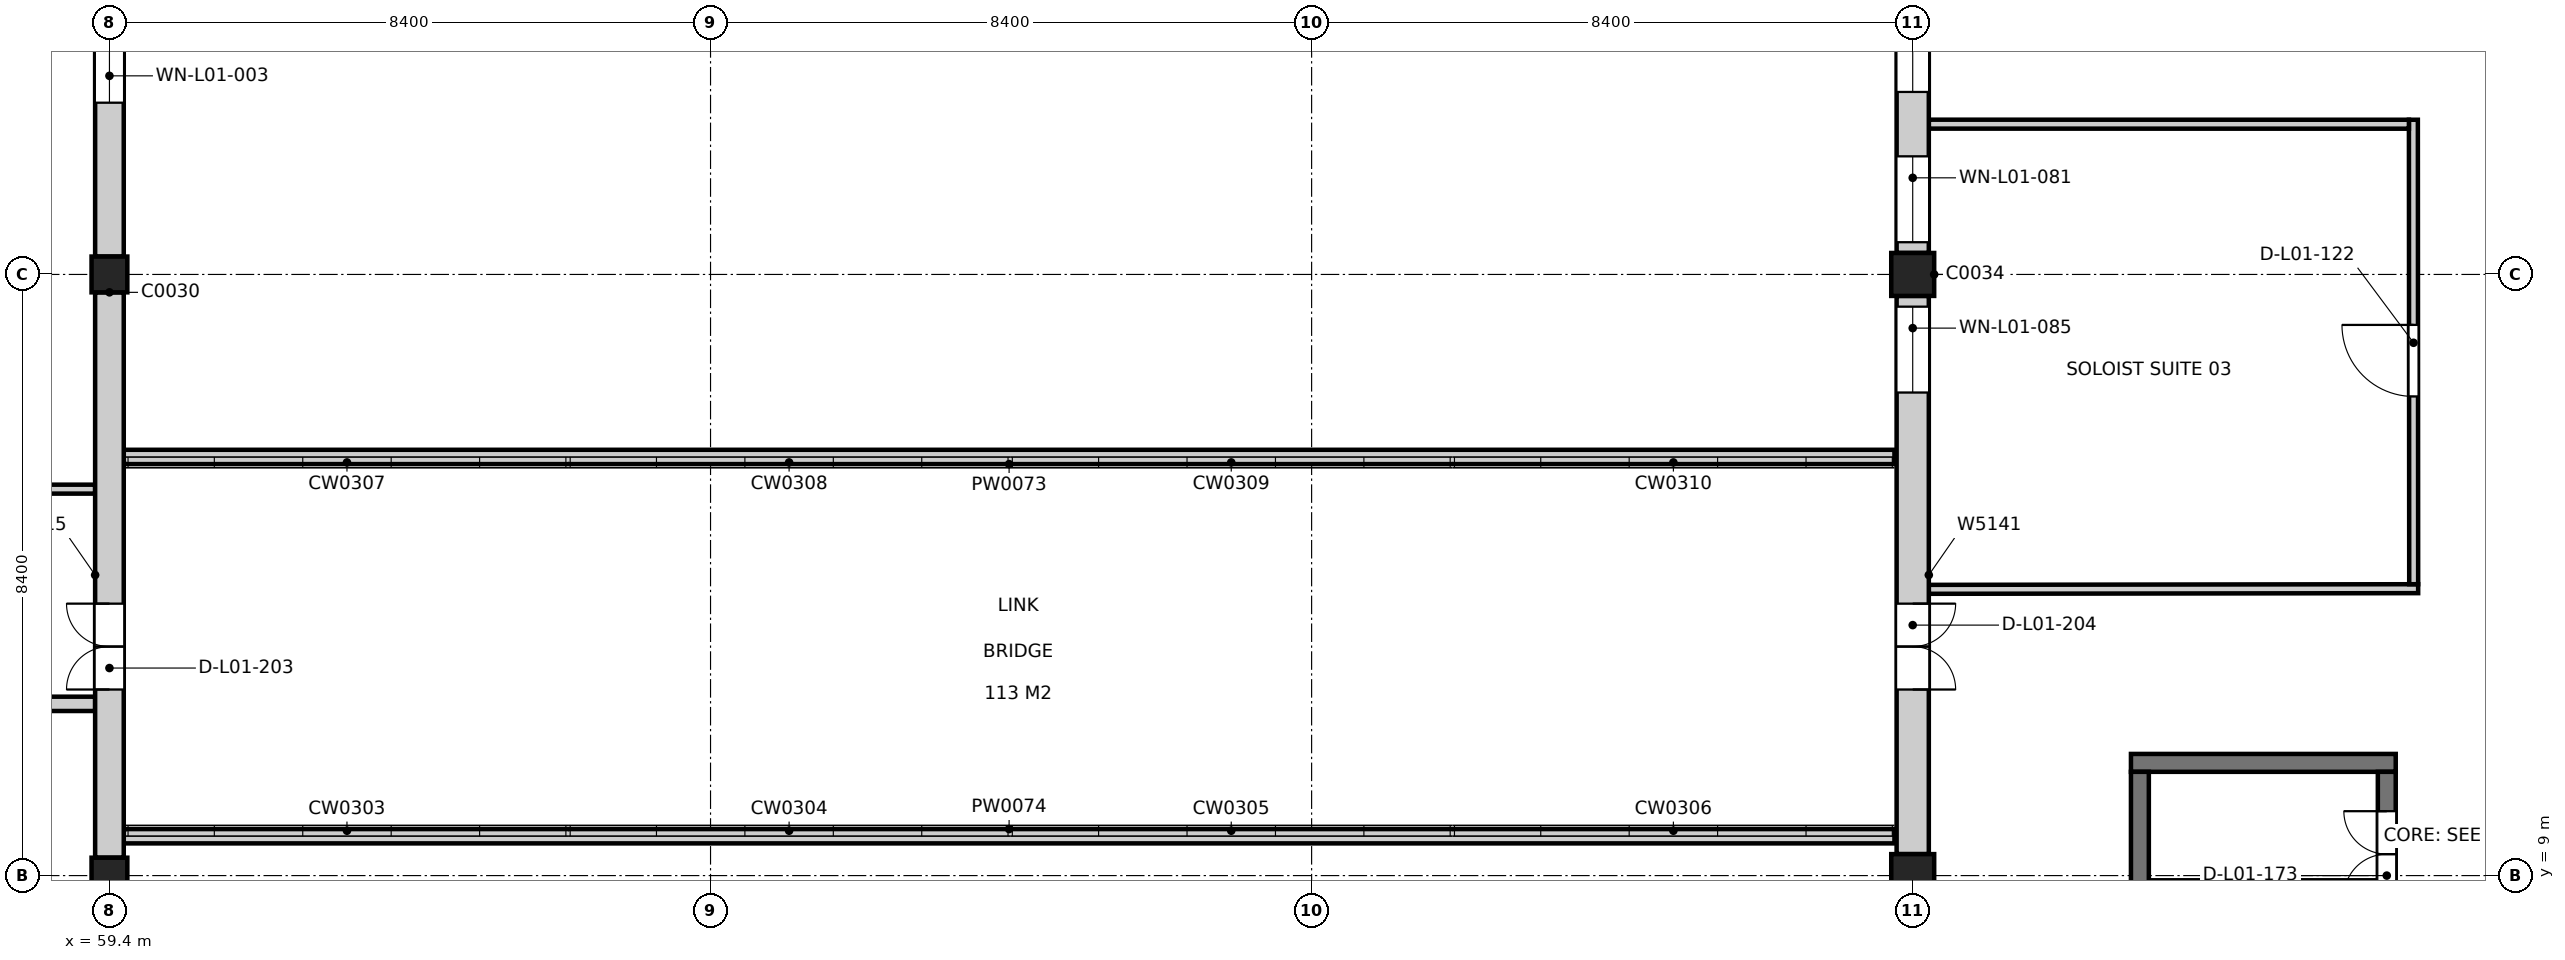
"""IFC4 building model, lengths in metres.
Left out: names, types, materials, properties, quantities, classifications, styles, units other than length and angle.
Written with IfcOpenShell. Run it as: python <this file> out.ifc"""

import sys

from ifc_helpers import new_model, si_unit, direction, frame, frame_2d, origin, origin_2d, place, context, subcontext, project, spatial, rectangle, extrude, element, fill, save


model = new_model("IFC4")
c1 = context("Model", 3, precision=1e-05, world=origin(), true_north=direction((0.0, 1.0)))
c2 = subcontext(c1, "Body", "Model", "MODEL_VIEW")
j1 = project(units=[si_unit("LENGTHUNIT", "METRE"), si_unit("PLANEANGLEUNIT", "RADIAN")], contexts=[c1])
p1 = place(None, origin())
s1 = spatial("IfcSite", under=j1, at=p1, CompositionType="ELEMENT")
p2 = place(p1, origin())
s2 = spatial("IfcBuilding", under=s1, at=p2, CompositionType="ELEMENT")
p3 = place(p2, frame((0.0, 0.0, 4.8)))
s3 = spatial("IfcBuildingStorey", under=s2, at=p3, CompositionType="ELEMENT", Elevation=4.8)
for number, where, z_axis, x_axis in (
    (1, (59.4, 9.0, 0.0), (0.0, 0.0, 1.0), (1.0, 0.0, 0.0)),
    (2, (59.4, 17.4, 0.0), (0.0, 0.0, 1.0), (1.0, 0.0, 0.0)),
):
    element("IfcColumn", number, at=place(p3, frame(where, z_axis=z_axis, x_axis=x_axis)), inside=s3, PredefinedType="COLUMN", context=c2, shape_type="SweptSolid", body=[
        extrude(rectangle(XDim=0.5, YDim=0.5, at=origin_2d()), origin(), (0.0, 0.0, 1.0), 4.8),
    ])
for number, where, z_axis, x_axis in (
    (3, (84.6, 9.0, 0.0), (0.0, 0.0, 1.0), (1.0, 0.0, 0.0)),
    (4, (84.6, 17.4, 0.0), (0.0, 0.0, 1.0), (1.0, 0.0, 0.0)),
):
    element("IfcColumn", number, at=place(p3, frame(where, z_axis=z_axis, x_axis=x_axis)), inside=s3, PredefinedType="COLUMN", context=c2, shape_type="SweptSolid", body=[
        extrude(rectangle(XDim=0.6, YDim=0.6, at=origin_2d()), origin(), (0.0, 0.0, 1.0), 4.8),
    ])
p4 = place(p3, frame((87.65, 10.575, 0.0), z_axis=(0.0, 0.0, 1.0), x_axis=(1.0, 0.0, 0.0)))
e5 = element("IfcWall", 5, at=p4, inside=s3, PredefinedType="SOLIDWALL", context=c2, shape_type="SweptSolid", body=[
    extrude(rectangle(XDim=3.7, YDim=0.25, at=frame_2d((1.85, 0.0))), origin(), (0.0, 0.0, 1.0), 4.8),
])
p5 = place(p3, frame((87.775, 3.55, 0.0), z_axis=(0.0, 0.0, 1.0), x_axis=(0.0, 1.0, 0.0)))
e6 = element("IfcWall", 6, at=p5, inside=s3, PredefinedType="SOLIDWALL", context=c2, shape_type="SweptSolid", body=[
    extrude(rectangle(XDim=6.9, YDim=0.25, at=frame_2d((3.45, 0.0))), origin(), (0.0, 0.0, 1.0), 4.8),
])
p6 = place(p3, frame((91.225, 3.55, 0.0), z_axis=(0.0, 0.0, 1.0), x_axis=(0.0, 1.0, 0.0)))
e7 = element("IfcWall", 7, at=p6, inside=s3, PredefinedType="SOLIDWALL", context=c2, shape_type="SweptSolid", body=[
    extrude(rectangle(XDim=6.9, YDim=0.25, at=frame_2d((3.45, 0.0))), origin(), (0.0, 0.0, 1.0), 4.8),
])
p7 = place(p6, frame((5.15, 0.0, 0.0)))
e8 = element("IfcOpeningElement", 8, at=p7, cuts=e7, PredefinedType="OPENING", context=c2, shape_type="SweptSolid", body=[
    extrude(rectangle(XDim=1.2, YDim=2.1, at=frame_2d((0.6, 1.05))), frame((0.0, 0.135, 0.0), z_axis=(0.0, -1.0, 0.0), x_axis=(1.0, 0.0, 0.0)), (0.0, 0.0, 1.0), 0.27),
])
p8 = place(p3, frame((84.825, 13.0, 0.0), z_axis=(0.0, 0.0, 1.0), x_axis=(0.999999127538, 0.001320955649, 0.0)))
e9 = element("IfcWall", 9, at=p8, inside=s3, PredefinedType="PARTITIONING", context=c2, shape_type="SweptSolid", body=[
    extrude(rectangle(XDim=6.838, YDim=0.125, at=frame_2d((3.419, 0.0))), origin(), (0.0, 0.0, 1.0), 4.64),
])
p9 = place(p3, frame((91.601, 13.072, 0.0), z_axis=(0.0, 0.0, 1.0), x_axis=(-0.000639506321, 0.999999795516, 0.0)))
e10 = element("IfcWall", 10, at=p9, inside=s3, PredefinedType="PARTITIONING", context=c2, shape_type="SweptSolid", body=[
    extrude(rectangle(XDim=6.49, YDim=0.125, at=frame_2d((3.245, 0.0))), origin(), (0.0, 0.0, 1.0), 3.84),
])
p10 = place(p9, frame((2.624, 0.0, 0.0)))
e11 = element("IfcOpeningElement", 11, at=p10, cuts=e10, PredefinedType="OPENING", context=c2, shape_type="SweptSolid", body=[
    extrude(rectangle(XDim=1.0, YDim=2.1, at=frame_2d((0.5, 1.05))), frame((0.0, 0.073, 0.0), z_axis=(0.0, -1.0, 0.0), x_axis=(1.0, 0.0, 0.0)), (0.0, 0.0, 1.0), 0.145),
])
p11 = place(p3, frame((91.534, 19.499, 0.0), z_axis=(0.0, 0.0, 1.0), x_axis=(-0.999999989407, 0.000145555109, 0.0)))
e12 = element("IfcWall", 12, at=p11, inside=s3, PredefinedType="PARTITIONING", context=c2, shape_type="SweptSolid", body=[
    extrude(rectangle(XDim=6.709, YDim=0.125, at=frame_2d((3.354, 0.0))), origin(), (0.0, 0.0, 1.0), 4.64),
])
p12 = place(p3, frame((56.0, 11.4, 0.0), z_axis=(0.0, 0.0, 1.0), x_axis=(1.0, 0.0, 0.0)))
e13 = element("IfcWall", 13, at=p12, inside=s3, PredefinedType="PARTITIONING", context=c2, shape_type="SweptSolid", body=[
    extrude(rectangle(XDim=3.2, YDim=0.2, at=frame_2d((1.6, 0.0))), origin(), (0.0, 0.0, 1.0), 4.64),
])
p13 = place(p12, frame((1.05, 0.0, 0.0)))
e14 = element("IfcOpeningElement", 14, at=p13, cuts=e13, PredefinedType="OPENING", context=c2, shape_type="SweptSolid", body=[
    extrude(rectangle(XDim=1.0, YDim=2.1, at=frame_2d((0.5, 1.05))), frame((0.0, 0.11, 0.0), z_axis=(0.0, -1.0, 0.0), x_axis=(1.0, 0.0, 0.0)), (0.0, 0.0, 1.0), 0.22),
])
p14 = place(p3, frame((50.02, 14.399, 0.0), z_axis=(0.0, 0.0, 1.0), x_axis=(0.999999994342, 0.000106380149, 0.0)))
e15 = element("IfcWall", 15, at=p14, inside=s3, PredefinedType="PARTITIONING", context=c2, shape_type="SweptSolid", body=[
    extrude(rectangle(XDim=9.18, YDim=0.125, at=frame_2d((4.59, 0.0))), origin(), (0.0, 0.0, 1.0), 3.84),
])
p15 = place(p14, frame((4.03, 0.0, 0.0)))
e16 = element("IfcOpeningElement", 16, at=p15, cuts=e15, PredefinedType="OPENING", context=c2, shape_type="SweptSolid", body=[
    extrude(rectangle(XDim=1.0, YDim=2.1, at=frame_2d((0.5, 1.05))), frame((0.0, 0.073, 0.0), z_axis=(0.0, -1.0, 0.0), x_axis=(1.0, 0.0, 0.0)), (0.0, 0.0, 1.0), 0.145),
])
p16 = place(p3, frame((59.4, 9.25, 0.0), z_axis=(0.0, 0.0, 1.0), x_axis=(0.0, 1.0, 0.0)))
e17 = element("IfcWall", 17, at=p16, inside=s3, PredefinedType="SOLIDWALL", context=c2, shape_type="SweptSolid", body=[
    extrude(rectangle(XDim=7.9, YDim=0.4, at=frame_2d((3.95, 0.0))), origin(), (0.0, 0.0, 1.0), 3.84),
])
p17 = place(p16, frame((2.35, 0.0, 0.0)))
e18 = element("IfcOpeningElement", 18, at=p17, cuts=e17, PredefinedType="OPENING", context=c2, shape_type="SweptSolid", body=[
    extrude(rectangle(XDim=1.2, YDim=2.1, at=frame_2d((0.6, 1.05))), frame((0.0, 0.21, 0.0), z_axis=(0.0, -1.0, 0.0), x_axis=(1.0, 0.0, 0.0)), (0.0, 0.0, 1.0), 0.42),
])
p18 = place(p3, frame((59.4, 17.65, 0.0), z_axis=(0.0, 0.0, 1.0), x_axis=(0.0, 1.0, 0.0)))
e19 = element("IfcWall", 19, at=p18, inside=s3, PredefinedType="SOLIDWALL", context=c2, shape_type="SweptSolid", body=[
    extrude(rectangle(XDim=7.9, YDim=0.4, at=frame_2d((3.95, 0.0))), origin(), (0.0, 0.0, 1.0), 3.84),
])
p19 = place(p18, frame((2.15, 0.0, 0.9)))
e20 = element("IfcOpeningElement", 20, at=p19, cuts=e19, PredefinedType="OPENING", context=c2, shape_type="SweptSolid", body=[
    extrude(rectangle(XDim=1.5, YDim=1.5, at=frame_2d((0.75, 0.75))), frame((0.0, 0.21, 0.0), z_axis=(0.0, -1.0, 0.0), x_axis=(1.0, 0.0, 0.0)), (0.0, 0.0, 1.0), 0.42),
])
p20 = place(p18, frame((4.25, 0.0, 0.9)))
e21 = element("IfcOpeningElement", 21, at=p20, cuts=e19, PredefinedType="OPENING", context=c2, shape_type="SweptSolid", body=[
    extrude(rectangle(XDim=1.5, YDim=1.5, at=frame_2d((0.75, 0.75))), frame((0.0, 0.21, 0.0), z_axis=(0.0, -1.0, 0.0), x_axis=(1.0, 0.0, 0.0)), (0.0, 0.0, 1.0), 0.42),
])
p21 = place(p3, frame((84.6, 25.5, 0.0), z_axis=(0.0, 0.0, 1.0), x_axis=(0.0, -1.0, 0.0)))
e22 = element("IfcWall", 22, at=p21, inside=s3, PredefinedType="SOLIDWALL", context=c2, shape_type="SweptSolid", body=[
    extrude(rectangle(XDim=7.8, YDim=0.45, at=frame_2d((3.9, 0.0))), origin(), (0.0, 0.0, 1.0), 3.84),
])
p22 = place(p21, frame((6.45, 0.0, 0.9)))
e23 = element("IfcOpeningElement", 23, at=p22, cuts=e22, PredefinedType="OPENING", context=c2, shape_type="SweptSolid", body=[
    extrude(rectangle(XDim=1.2, YDim=2.4, at=frame_2d((0.6, 1.2))), frame((0.0, 0.235, 0.0), z_axis=(0.0, -1.0, 0.0), x_axis=(1.0, 0.0, 0.0)), (0.0, 0.0, 1.0), 0.47),
])
p23 = place(p21, frame((4.35, 0.0, 0.9)))
e24 = element("IfcOpeningElement", 24, at=p23, cuts=e22, PredefinedType="OPENING", context=c2, shape_type="SweptSolid", body=[
    extrude(rectangle(XDim=1.2, YDim=2.4, at=frame_2d((0.6, 1.2))), frame((0.0, 0.235, 0.0), z_axis=(0.0, -1.0, 0.0), x_axis=(1.0, 0.0, 0.0)), (0.0, 0.0, 1.0), 0.47),
])
p24 = place(p21, frame((2.25, 0.0, 0.9)))
e25 = element("IfcOpeningElement", 25, at=p24, cuts=e22, PredefinedType="OPENING", context=c2, shape_type="SweptSolid", body=[
    extrude(rectangle(XDim=1.2, YDim=2.4, at=frame_2d((0.6, 1.2))), frame((0.0, 0.235, 0.0), z_axis=(0.0, -1.0, 0.0), x_axis=(1.0, 0.0, 0.0)), (0.0, 0.0, 1.0), 0.47),
])
p25 = place(p21, frame((0.15, 0.0, 0.9)))
e26 = element("IfcOpeningElement", 26, at=p25, cuts=e22, PredefinedType="OPENING", context=c2, shape_type="SweptSolid", body=[
    extrude(rectangle(XDim=1.2, YDim=2.4, at=frame_2d((0.6, 1.2))), frame((0.0, 0.235, 0.0), z_axis=(0.0, -1.0, 0.0), x_axis=(1.0, 0.0, 0.0)), (0.0, 0.0, 1.0), 0.47),
])
p26 = place(p3, frame((84.6, 17.1, 0.0), z_axis=(0.0, 0.0, 1.0), x_axis=(0.0, -1.0, 0.0)))
e27 = element("IfcWall", 27, at=p26, inside=s3, PredefinedType="SOLIDWALL", context=c2, shape_type="SweptSolid", body=[
    extrude(rectangle(XDim=7.8, YDim=0.45, at=frame_2d((3.9, 0.0))), origin(), (0.0, 0.0, 1.0), 3.84),
])
p27 = place(p26, frame((0.15, 0.0, 0.9)))
e28 = element("IfcOpeningElement", 28, at=p27, cuts=e27, PredefinedType="OPENING", context=c2, shape_type="SweptSolid", body=[
    extrude(rectangle(XDim=1.2, YDim=2.4, at=frame_2d((0.6, 1.2))), frame((0.0, 0.235, 0.0), z_axis=(0.0, -1.0, 0.0), x_axis=(1.0, 0.0, 0.0)), (0.0, 0.0, 1.0), 0.47),
])
p28 = place(p26, frame((4.3, 0.0, 0.0)))
e29 = element("IfcOpeningElement", 29, at=p28, cuts=e27, PredefinedType="OPENING", context=c2, shape_type="SweptSolid", body=[
    extrude(rectangle(XDim=1.2, YDim=2.1, at=frame_2d((0.6, 1.05))), frame((0.0, 0.235, 0.0), z_axis=(0.0, -1.0, 0.0), x_axis=(1.0, 0.0, 0.0)), (0.0, 0.0, 1.0), 0.47),
])
for number, where, z_axis, x_axis in (
    (30, (84.345, 14.85, 3.58), (0.0, 0.0, 1.0), (-1.0, 0.0, 0.0)),
    (31, (59.6, 9.55, 3.58), (0.0, 0.0, 1.0), (1.0, 0.0, 0.0)),
):
    element("IfcWall", number, at=place(p3, frame(where, z_axis=z_axis, x_axis=x_axis)), inside=s3, PredefinedType="PARAPET", context=c2, shape_type="SweptSolid", body=[
        extrude(rectangle(XDim=24.745, YDim=0.2, at=frame_2d((12.373, 0.0))), origin(), (0.0, 0.0, 1.0), 1.1),
    ])
p29 = place(p10, origin())
e32 = element("IfcDoor", 32, at=p29, inside=s3, OperationType="SINGLE_SWING_RIGHT", PredefinedType="DOOR", context=c2, shape_type="SweptSolid", body=[
    extrude(rectangle(XDim=1.0, YDim=2.1, at=frame_2d((0.5, 1.05))), frame((0.0, 0.025, 0.0), z_axis=(0.0, -1.0, 0.0), x_axis=(1.0, 0.0, 0.0)), (0.0, 0.0, 1.0), 0.05),
])
fill(e11, e32)
p30 = place(p7, origin())
e33 = element("IfcDoor", 33, at=p30, inside=s3, OperationType="DOUBLE_DOOR_SINGLE_SWING", PredefinedType="DOOR", context=c2, shape_type="SweptSolid", body=[
    extrude(rectangle(XDim=1.2, YDim=2.1, at=frame_2d((0.6, 1.05))), frame((0.0, 0.025, 0.0), z_axis=(0.0, -1.0, 0.0), x_axis=(1.0, 0.0, 0.0)), (0.0, 0.0, 1.0), 0.05),
])
fill(e8, e33)
p31 = place(p19, origin())
e34 = element("IfcWindow", 34, at=p31, inside=s3, PartitioningType="DOUBLE_PANEL_VERTICAL", PredefinedType="WINDOW", context=c2, shape_type="SweptSolid", body=[
    extrude(rectangle(XDim=1.5, YDim=1.5, at=frame_2d((0.75, 0.75))), frame((0.0, 0.15, 0.0), z_axis=(0.0, -1.0, 0.0), x_axis=(1.0, 0.0, 0.0)), (0.0, 0.0, 1.0), 0.06),
])
fill(e20, e34)
p32 = place(p22, origin())
e35 = element("IfcWindow", 35, at=p32, inside=s3, PartitioningType="SINGLE_PANEL", PredefinedType="WINDOW", context=c2, shape_type="SweptSolid", body=[
    extrude(rectangle(XDim=1.2, YDim=2.4, at=frame_2d((0.6, 1.2))), frame((0.0, 0.135, 0.0), z_axis=(0.0, -1.0, 0.0), x_axis=(1.0, 0.0, 0.0)), (0.0, 0.0, 1.0), 0.06),
])
fill(e23, e35)
p33 = place(p23, origin())
e36 = element("IfcWindow", 36, at=p33, inside=s3, PartitioningType="SINGLE_PANEL", PredefinedType="WINDOW", context=c2, shape_type="SweptSolid", body=[
    extrude(rectangle(XDim=1.2, YDim=2.4, at=frame_2d((0.6, 1.2))), frame((0.0, 0.135, 0.0), z_axis=(0.0, -1.0, 0.0), x_axis=(1.0, 0.0, 0.0)), (0.0, 0.0, 1.0), 0.06),
])
fill(e24, e36)
p34 = place(p27, origin())
e37 = element("IfcWindow", 37, at=p34, inside=s3, PartitioningType="SINGLE_PANEL", PredefinedType="WINDOW", context=c2, shape_type="SweptSolid", body=[
    extrude(rectangle(XDim=1.2, YDim=2.4, at=frame_2d((0.6, 1.2))), frame((0.0, 0.135, 0.0), z_axis=(0.0, -1.0, 0.0), x_axis=(1.0, 0.0, 0.0)), (0.0, 0.0, 1.0), 0.06),
])
fill(e28, e37)
p35 = place(p17, origin())
e38 = element("IfcDoor", 38, at=p35, inside=s3, OperationType="DOUBLE_DOOR_SINGLE_SWING", PredefinedType="DOOR", context=c2, shape_type="SweptSolid", body=[
    extrude(rectangle(XDim=1.2, YDim=2.1, at=frame_2d((0.6, 1.05))), frame((0.0, 0.025, 0.0), z_axis=(0.0, -1.0, 0.0), x_axis=(1.0, 0.0, 0.0)), (0.0, 0.0, 1.0), 0.05),
])
fill(e18, e38)
p36 = place(p28, origin())
e39 = element("IfcDoor", 39, at=p36, inside=s3, OperationType="DOUBLE_DOOR_SINGLE_SWING", PredefinedType="DOOR", context=c2, shape_type="SweptSolid", body=[
    extrude(rectangle(XDim=1.2, YDim=2.1, at=frame_2d((0.6, 1.05))), frame((0.0, 0.025, 0.0), z_axis=(0.0, -1.0, 0.0), x_axis=(1.0, 0.0, 0.0)), (0.0, 0.0, 1.0), 0.05),
])
fill(e29, e39)
save(model, sys.argv[1])
